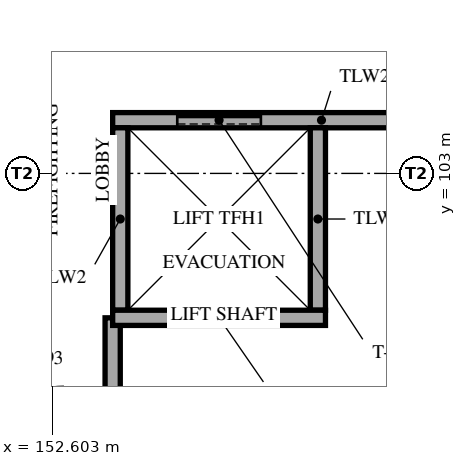
"""IFC4 building model, lengths in metres.
Left out: names, types, materials, properties, quantities, classifications, styles, units other than length and angle.
Written with IfcOpenShell. Run it as: python <this file> out.ifc"""

import sys

from ifc_helpers import new_model, si_unit, direction, frame, frame_2d, origin, place, context, subcontext, project, spatial, rectangle, extrude, element, fill, save


model = new_model("IFC4")
c1 = context("Model", 3, precision=1e-05, world=origin(), true_north=direction((0.0, 1.0)))
c2 = subcontext(c1, "Body", "Model", "MODEL_VIEW")
j1 = project(units=[si_unit("LENGTHUNIT", "METRE"), si_unit("PLANEANGLEUNIT", "RADIAN")], contexts=[c1])
p1 = place(None, origin())
s1 = spatial("IfcSite", under=j1, at=p1, CompositionType="ELEMENT")
p2 = place(p1, origin())
s2 = spatial("IfcBuilding", under=s1, at=p2, CompositionType="ELEMENT")
p3 = place(p2, frame((0.0, 0.0, 5.0)))
s3 = spatial("IfcBuildingStorey", under=s2, at=p3, CompositionType="ELEMENT", Elevation=5.0)
p4 = place(p3, frame((153.4, 103.7, 0.0), z_axis=(0.0, 0.0, 1.0), x_axis=(1.0, 0.0, 0.0)))
e1 = element("IfcWall", 1, at=p4, inside=s3, PredefinedType="SOLIDWALL", context=c2, shape_type="SweptSolid", body=[
    extrude(rectangle(XDim=5.495, YDim=0.2, at=frame_2d((2.748, 0.0))), origin(), (0.0, 0.0, 1.0), 4.59),
])
p5 = place(p4, frame((0.85, 0.0, 0.0)))
e2 = element("IfcOpeningElement", 2, at=p5, cuts=e1, PredefinedType="OPENING", context=c2, shape_type="SweptSolid", body=[
    extrude(rectangle(XDim=1.1, YDim=2.1, at=frame_2d((0.55, 1.05))), frame((0.0, 0.11, 0.0), z_axis=(0.0, -1.0, 0.0), x_axis=(1.0, 0.0, 0.0)), (0.0, 0.0, 1.0), 0.22),
])
p6 = place(p3, frame((153.4, 99.1, 0.0), z_axis=(0.0, 0.0, 1.0), x_axis=(0.0, 1.0, 0.0)))
e3 = element("IfcWall", 3, at=p6, inside=s3, PredefinedType="SOLIDWALL", context=c2, shape_type="SweptSolid", body=[
    extrude(rectangle(XDim=2.0, YDim=0.2, at=frame_2d((1.0, 0.0))), origin(), (0.0, 0.0, 1.0), 4.59),
])
for number, where, z_axis, x_axis in (
    (4, (153.5, 101.2, 0.0), (0.0, 0.0, 1.0), (0.0, 1.0, 0.0)),
    (5, (156.1, 101.2, 0.0), (0.0, 0.0, 1.0), (0.0, 1.0, 0.0)),
):
    element("IfcWall", number, at=place(p3, frame(where, z_axis=z_axis, x_axis=x_axis)), inside=s3, PredefinedType="SOLIDWALL", context=c2, shape_type="SweptSolid", body=[
        extrude(rectangle(XDim=2.4, YDim=0.2, at=frame_2d((1.2, 0.0))), origin(), (0.0, 0.0, 1.0), 4.59),
    ])
p7 = place(p3, frame((153.4, 101.1, 0.0), z_axis=(0.0, 0.0, 1.0), x_axis=(1.0, 0.0, 0.0)))
e6 = element("IfcWall", 6, at=p7, inside=s3, PredefinedType="SOLIDWALL", context=c2, shape_type="SweptSolid", body=[
    extrude(rectangle(XDim=2.8, YDim=0.2, at=frame_2d((1.4, 0.0))), origin(), (0.0, 0.0, 1.0), 4.59),
])
p8 = place(p5, origin())
e7 = element("IfcDoor", 7, at=p8, inside=s3, OperationType="SLIDING_TO_LEFT", PredefinedType="DOOR", context=c2, shape_type="SweptSolid", body=[
    extrude(rectangle(XDim=1.1, YDim=2.1, at=frame_2d((0.55, 1.05))), frame((0.0, 0.025, 0.0), z_axis=(0.0, -1.0, 0.0), x_axis=(1.0, 0.0, 0.0)), (0.0, 0.0, 1.0), 0.05),
])
fill(e2, e7)
save(model, sys.argv[1])
